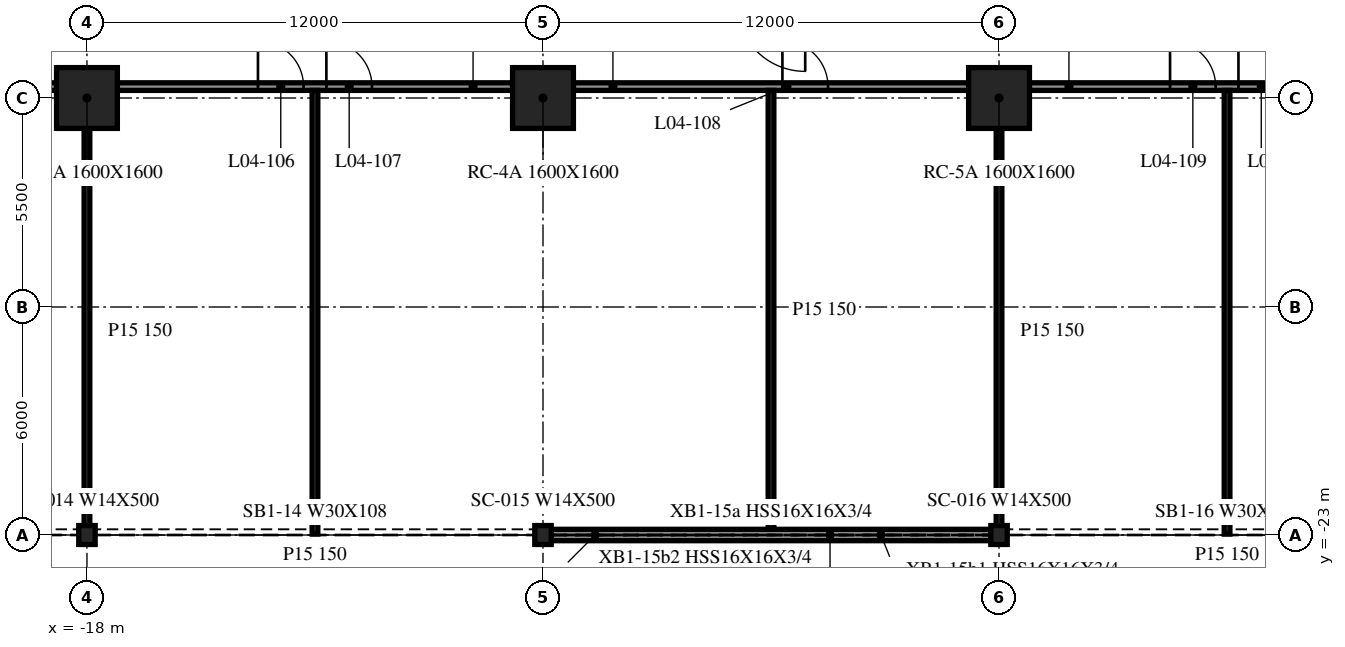
"""IFC4 building model, lengths in metres.
Left out: names, types, materials, properties, quantities, classifications, styles, units other than length and angle.
Written with IfcOpenShell. Run it as: python <this file> out.ifc"""

import sys

from ifc_helpers import new_model, si_unit, direction, frame, frame_2d, origin, origin_2d, place, context, subcontext, project, spatial, rectangle, i_section, extrude, element, fill, save


model = new_model("IFC4")
c1 = context("Model", 3, precision=1e-05, world=origin(), true_north=direction((0.0, 1.0)))
c2 = subcontext(c1, "Body", "Model", "MODEL_VIEW")
j1 = project(units=[si_unit("LENGTHUNIT", "METRE"), si_unit("PLANEANGLEUNIT", "RADIAN")], contexts=[c1])
p1 = place(None, origin())
s1 = spatial("IfcSite", under=j1, at=p1, CompositionType="ELEMENT")
p2 = place(p1, origin())
s2 = spatial("IfcBuilding", under=s1, at=p2, CompositionType="ELEMENT")
p3 = place(p2, frame((0.0, 0.0, 20.1)))
s3 = spatial("IfcBuildingStorey", under=s2, at=p3, CompositionType="ELEMENT", Elevation=20.1)
for number, where, z_axis, x_axis in (
    (1, (-18.0, -11.5, -0.34), (0.0, 0.0, 1.0), (1.0, 0.0, 0.0)),
    (2, (-6.0, -11.5, -0.34), (0.0, 0.0, 1.0), (1.0, 0.0, 0.0)),
    (3, (6.0, -11.5, -0.34), (0.0, 0.0, 1.0), (1.0, 0.0, 0.0)),
):
    element("IfcColumn", number, at=place(p3, frame(where, z_axis=z_axis, x_axis=x_axis)), inside=s3, PredefinedType="COLUMN", context=c2, shape_type="SweptSolid", body=[
        extrude(rectangle(XDim=1.6, YDim=1.6, at=origin_2d()), origin(), (0.0, 0.0, 1.0), 4.3),
    ])
for number, where, z_axis, x_axis in (
    (4, (-18.0, -23.0, -0.34), (0.0, 0.0, 1.0), (1.0, 0.0, 0.0)),
    (5, (-6.0, -23.0, -0.34), (0.0, 0.0, 1.0), (1.0, 0.0, 0.0)),
    (6, (6.0, -23.0, -0.34), (0.0, 0.0, 1.0), (1.0, 0.0, 0.0)),
):
    element("IfcColumn", number, at=place(p3, frame(where, z_axis=z_axis, x_axis=x_axis)), inside=s3, PredefinedType="COLUMN", context=c2, shape_type="SweptSolid", body=[
        extrude(i_section(OverallWidth=0.432, OverallDepth=0.498, WebThickness=0.056, FlangeThickness=0.089, at=origin_2d()), origin(), (0.0, 0.0, 1.0), 4.3),
    ])
p4 = place(p3, frame((-5.972, -23.0, 0.0), z_axis=(0.0, 0.0, 1.0), x_axis=(1.0, 0.0, 0.0)))
e7 = element("IfcWall", 7, at=p4, inside=s3, PredefinedType="NOTDEFINED", context=c2, shape_type="SweptSolid", body=[
    extrude(rectangle(XDim=11.944, YDim=0.3, at=frame_2d((5.972, 0.0))), origin(), (0.0, 0.0, 1.0), 3.203),
])
p5 = place(p3, frame((-29.2, -11.2, 0.0), z_axis=(0.0, 0.0, 1.0), x_axis=(1.0, 0.0, 0.0)))
e8 = element("IfcWall", 8, at=p5, inside=s3, PredefinedType="PARTITIONING", context=c2, shape_type="SweptSolid", body=[
    extrude(rectangle(XDim=10.4, YDim=0.2, at=frame_2d((5.2, 0.0))), origin(), (0.0, 0.0, 1.0), 3.96),
])
p6 = place(p5, frame((3.7, 0.0, 0.0)))
e9 = element("IfcOpeningElement", 9, at=p6, cuts=e8, PredefinedType="OPENING", context=c2, shape_type="SweptSolid", body=[
    extrude(rectangle(XDim=1.2, YDim=2.1, at=frame_2d((0.6, 1.05))), frame((0.0, 0.11, 0.0), z_axis=(0.0, -1.0, 0.0), x_axis=(1.0, 0.0, 0.0)), (0.0, 0.0, 1.0), 0.22),
])
p7 = place(p5, frame((5.5, 0.0, 0.0)))
e10 = element("IfcOpeningElement", 10, at=p7, cuts=e8, PredefinedType="OPENING", context=c2, shape_type="SweptSolid", body=[
    extrude(rectangle(XDim=1.2, YDim=2.1, at=frame_2d((0.6, 1.05))), frame((0.0, 0.11, 0.0), z_axis=(0.0, -1.0, 0.0), x_axis=(1.0, 0.0, 0.0)), (0.0, 0.0, 1.0), 0.22),
])
p8 = place(p5, frame((8.5, 0.0, 0.0)))
e11 = element("IfcOpeningElement", 11, at=p8, cuts=e8, PredefinedType="OPENING", context=c2, shape_type="SweptSolid", body=[
    extrude(rectangle(XDim=1.0, YDim=2.1, at=frame_2d((0.5, 1.05))), frame((0.0, 0.11, 0.0), z_axis=(0.0, -1.0, 0.0), x_axis=(1.0, 0.0, 0.0)), (0.0, 0.0, 1.0), 0.22),
])
p9 = place(p3, frame((-17.2, -11.2, 0.0), z_axis=(0.0, 0.0, 1.0), x_axis=(1.0, 0.0, 0.0)))
e12 = element("IfcWall", 12, at=p9, inside=s3, PredefinedType="PARTITIONING", context=c2, shape_type="SweptSolid", body=[
    extrude(rectangle(XDim=10.4, YDim=0.2, at=frame_2d((5.2, 0.0))), origin(), (0.0, 0.0, 1.0), 3.96),
])
p10 = place(p9, frame((3.7, 0.0, 0.0)))
e13 = element("IfcOpeningElement", 13, at=p10, cuts=e12, PredefinedType="OPENING", context=c2, shape_type="SweptSolid", body=[
    extrude(rectangle(XDim=1.2, YDim=2.1, at=frame_2d((0.6, 1.05))), frame((0.0, 0.11, 0.0), z_axis=(0.0, -1.0, 0.0), x_axis=(1.0, 0.0, 0.0)), (0.0, 0.0, 1.0), 0.22),
])
p11 = place(p9, frame((5.5, 0.0, 0.0)))
e14 = element("IfcOpeningElement", 14, at=p11, cuts=e12, PredefinedType="OPENING", context=c2, shape_type="SweptSolid", body=[
    extrude(rectangle(XDim=1.2, YDim=2.1, at=frame_2d((0.6, 1.05))), frame((0.0, 0.11, 0.0), z_axis=(0.0, -1.0, 0.0), x_axis=(1.0, 0.0, 0.0)), (0.0, 0.0, 1.0), 0.22),
])
p12 = place(p3, frame((-5.2, -11.2, 0.0), z_axis=(0.0, 0.0, 1.0), x_axis=(1.0, 0.0, 0.0)))
e15 = element("IfcWall", 15, at=p12, inside=s3, PredefinedType="PARTITIONING", context=c2, shape_type="SweptSolid", body=[
    extrude(rectangle(XDim=10.4, YDim=0.2, at=frame_2d((5.2, 0.0))), origin(), (0.0, 0.0, 1.0), 3.96),
])
p13 = place(p12, frame((5.5, 0.0, 0.0)))
e16 = element("IfcOpeningElement", 16, at=p13, cuts=e15, PredefinedType="OPENING", context=c2, shape_type="SweptSolid", body=[
    extrude(rectangle(XDim=1.2, YDim=2.1, at=frame_2d((0.6, 1.05))), frame((0.0, 0.11, 0.0), z_axis=(0.0, -1.0, 0.0), x_axis=(1.0, 0.0, 0.0)), (0.0, 0.0, 1.0), 0.22),
])
p14 = place(p3, frame((6.8, -11.2, 0.0), z_axis=(0.0, 0.0, 1.0), x_axis=(1.0, 0.0, 0.0)))
e17 = element("IfcWall", 17, at=p14, inside=s3, PredefinedType="PARTITIONING", context=c2, shape_type="SweptSolid", body=[
    extrude(rectangle(XDim=10.4, YDim=0.2, at=frame_2d((5.2, 0.0))), origin(), (0.0, 0.0, 1.0), 3.96),
])
p15 = place(p14, frame((3.7, 0.0, 0.0)))
e18 = element("IfcOpeningElement", 18, at=p15, cuts=e17, PredefinedType="OPENING", context=c2, shape_type="SweptSolid", body=[
    extrude(rectangle(XDim=1.2, YDim=2.1, at=frame_2d((0.6, 1.05))), frame((0.0, 0.11, 0.0), z_axis=(0.0, -1.0, 0.0), x_axis=(1.0, 0.0, 0.0)), (0.0, 0.0, 1.0), 0.22),
])
p16 = place(p14, frame((5.5, 0.0, 0.0)))
e19 = element("IfcOpeningElement", 19, at=p16, cuts=e17, PredefinedType="OPENING", context=c2, shape_type="SweptSolid", body=[
    extrude(rectangle(XDim=1.2, YDim=2.1, at=frame_2d((0.6, 1.05))), frame((0.0, 0.11, 0.0), z_axis=(0.0, -1.0, 0.0), x_axis=(1.0, 0.0, 0.0)), (0.0, 0.0, 1.0), 0.22),
])
p17 = place(p14, frame((8.5, 0.0, 0.0)))
e20 = element("IfcOpeningElement", 20, at=p17, cuts=e17, PredefinedType="OPENING", context=c2, shape_type="SweptSolid", body=[
    extrude(rectangle(XDim=1.2, YDim=2.1, at=frame_2d((0.6, 1.05))), frame((0.0, 0.11, 0.0), z_axis=(0.0, -1.0, 0.0), x_axis=(1.0, 0.0, 0.0)), (0.0, 0.0, 1.0), 0.22),
])
p18 = place(p3, frame((-18.0, -22.975, 0.0), z_axis=(0.0, 0.0, 1.0), x_axis=(0.0, 1.0, 0.0)))
e21 = element("IfcWall", 21, at=p18, inside=s3, PredefinedType="PARTITIONING", context=c2, shape_type="SweptSolid", body=[
    extrude(rectangle(XDim=10.675, YDim=0.15, at=frame_2d((5.337, 0.0))), origin(), (0.0, 0.0, 1.0), 3.96),
])
p19 = place(p3, frame((-12.0, -22.975, 0.0), z_axis=(0.0, 0.0, 1.0), x_axis=(0.0, 1.0, 0.0)))
e22 = element("IfcWall", 22, at=p19, inside=s3, PredefinedType="PARTITIONING", context=c2, shape_type="SweptSolid", body=[
    extrude(rectangle(XDim=11.675, YDim=0.15, at=frame_2d((5.837, 0.0))), origin(), (0.0, 0.0, 1.0), 3.96),
])
p20 = place(p3, frame((0.0, -22.85, 0.0), z_axis=(0.0, 0.0, 1.0), x_axis=(0.0, 1.0, 0.0)))
e23 = element("IfcWall", 23, at=p20, inside=s3, PredefinedType="PARTITIONING", context=c2, shape_type="SweptSolid", body=[
    extrude(rectangle(XDim=11.55, YDim=0.15, at=frame_2d((5.775, 0.0))), origin(), (0.0, 0.0, 1.0), 3.96),
])
p21 = place(p3, frame((6.0, -22.975, 0.0), z_axis=(0.0, 0.0, 1.0), x_axis=(0.0, 1.0, 0.0)))
e24 = element("IfcWall", 24, at=p21, inside=s3, PredefinedType="PARTITIONING", context=c2, shape_type="SweptSolid", body=[
    extrude(rectangle(XDim=10.675, YDim=0.15, at=frame_2d((5.337, 0.0))), origin(), (0.0, 0.0, 1.0), 3.96),
])
p22 = place(p3, frame((12.0, -22.975, 0.0), z_axis=(0.0, 0.0, 1.0), x_axis=(0.0, 1.0, 0.0)))
e25 = element("IfcWall", 25, at=p22, inside=s3, PredefinedType="PARTITIONING", context=c2, shape_type="SweptSolid", body=[
    extrude(rectangle(XDim=11.675, YDim=0.15, at=frame_2d((5.837, 0.0))), origin(), (0.0, 0.0, 1.0), 3.96),
])
p23 = place(p10, origin())
e26 = element("IfcDoor", 26, at=p23, inside=s3, OperationType="SINGLE_SWING_RIGHT", PredefinedType="DOOR", context=c2, shape_type="SweptSolid", body=[
    extrude(rectangle(XDim=1.2, YDim=2.1, at=frame_2d((0.6, 1.05))), frame((0.0, 0.025, 0.0), z_axis=(0.0, -1.0, 0.0), x_axis=(1.0, 0.0, 0.0)), (0.0, 0.0, 1.0), 0.05),
])
fill(e13, e26)
p24 = place(p11, origin())
e27 = element("IfcDoor", 27, at=p24, inside=s3, OperationType="SINGLE_SWING_LEFT", PredefinedType="DOOR", context=c2, shape_type="SweptSolid", body=[
    extrude(rectangle(XDim=1.2, YDim=2.1, at=frame_2d((0.6, 1.05))), frame((0.0, 0.025, 0.0), z_axis=(0.0, -1.0, 0.0), x_axis=(1.0, 0.0, 0.0)), (0.0, 0.0, 1.0), 0.05),
])
fill(e14, e27)
p25 = place(p13, origin())
e28 = element("IfcDoor", 28, at=p25, inside=s3, OperationType="SINGLE_SWING_LEFT", PredefinedType="DOOR", context=c2, shape_type="SweptSolid", body=[
    extrude(rectangle(XDim=1.2, YDim=2.1, at=frame_2d((0.6, 1.05))), frame((0.0, 0.025, 0.0), z_axis=(0.0, -1.0, 0.0), x_axis=(1.0, 0.0, 0.0)), (0.0, 0.0, 1.0), 0.05),
])
fill(e16, e28)
p26 = place(p15, origin())
e29 = element("IfcDoor", 29, at=p26, inside=s3, OperationType="SINGLE_SWING_RIGHT", PredefinedType="DOOR", context=c2, shape_type="SweptSolid", body=[
    extrude(rectangle(XDim=1.2, YDim=2.1, at=frame_2d((0.6, 1.05))), frame((0.0, 0.025, 0.0), z_axis=(0.0, -1.0, 0.0), x_axis=(1.0, 0.0, 0.0)), (0.0, 0.0, 1.0), 0.05),
])
fill(e18, e29)
p27 = place(p16, origin())
e30 = element("IfcDoor", 30, at=p27, inside=s3, OperationType="SINGLE_SWING_LEFT", PredefinedType="DOOR", context=c2, shape_type="SweptSolid", body=[
    extrude(rectangle(XDim=1.2, YDim=2.1, at=frame_2d((0.6, 1.05))), frame((0.0, 0.025, 0.0), z_axis=(0.0, -1.0, 0.0), x_axis=(1.0, 0.0, 0.0)), (0.0, 0.0, 1.0), 0.05),
])
fill(e19, e30)
save(model, sys.argv[1])
